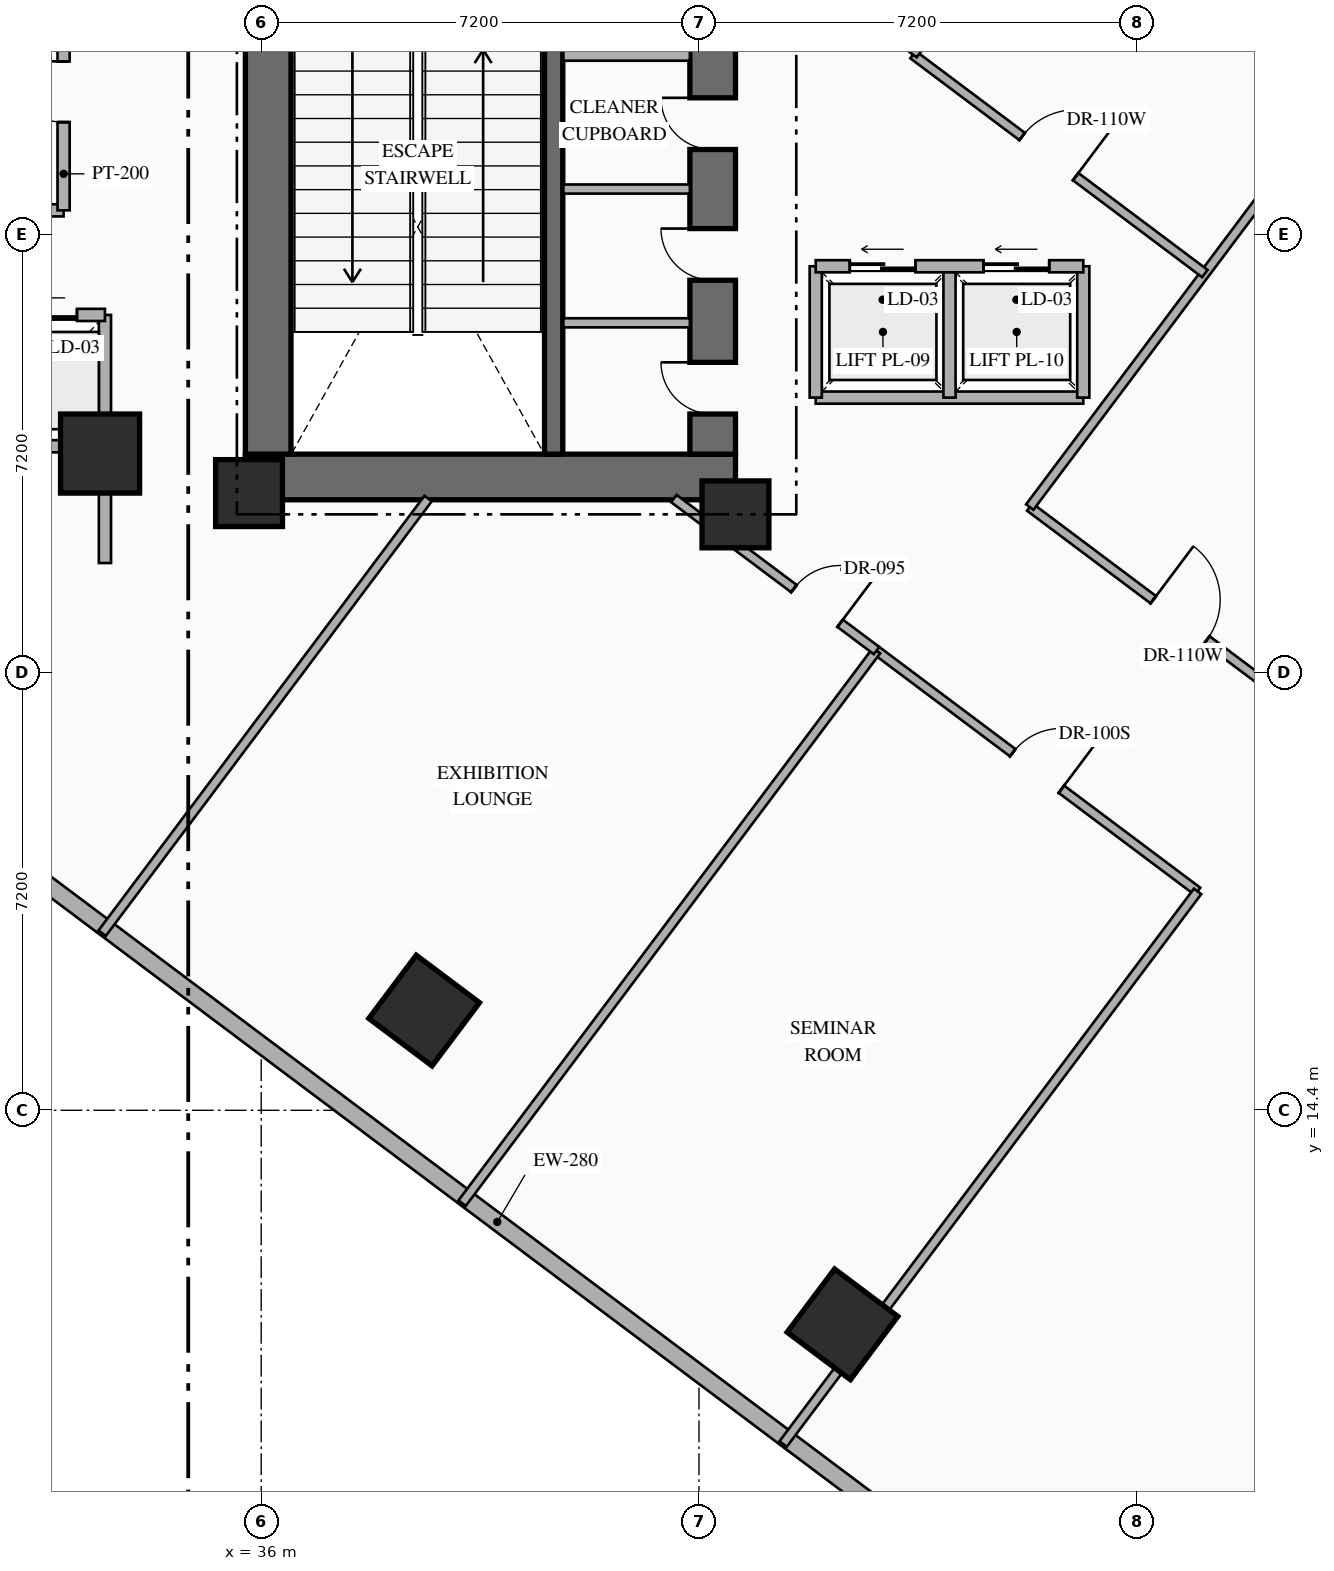
"""IFC4 building model, lengths in metres.
Left out: names, types, materials, properties, quantities, classifications, styles, units other than length and angle.
Written with IfcOpenShell. Run it as: python <this file> out.ifc"""

import sys

from ifc_helpers import new_model, si_unit, direction, frame, frame_2d, origin, origin_2d, place, context, subcontext, project, spatial, rectangle, extrude, element, fill, save


model = new_model("IFC4")
c1 = context("Model", 3, precision=1e-05, world=origin(), true_north=direction((0.0, 1.0)))
c2 = subcontext(c1, "Body", "Model", "MODEL_VIEW")
j1 = project(units=[si_unit("LENGTHUNIT", "METRE"), si_unit("PLANEANGLEUNIT", "RADIAN")], contexts=[c1])
p1 = place(None, origin())
s1 = spatial("IfcSite", under=j1, at=p1, CompositionType="ELEMENT")
p2 = place(p1, origin())
s2 = spatial("IfcBuilding", under=s1, at=p2, CompositionType="ELEMENT")
p3 = place(p2, frame((0.0, 0.0, 10.8)))
s3 = spatial("IfcBuildingStorey", under=s2, at=p3, CompositionType="ELEMENT", Elevation=10.8)
p4 = place(p3, frame((35.74, 24.815, 0.0), z_axis=(0.0, 0.0, 1.0), x_axis=(1.0, 0.0, 0.0)))
e1 = element("IfcWall", 1, at=p4, inside=s3, PredefinedType="SHEAR", context=c2, shape_type="SweptSolid", body=[
    extrude(rectangle(XDim=8.06, YDim=0.75, at=frame_2d((4.03, 0.0))), origin(), (0.0, 0.0, 1.0), 5.4),
])
p5 = place(p3, frame((36.115, 25.19, 0.0), z_axis=(0.0, 0.0, 1.0), x_axis=(0.0, 1.0, 0.0)))
e2 = element("IfcWall", 2, at=p5, inside=s3, PredefinedType="SHEAR", context=c2, shape_type="SweptSolid", body=[
    extrude(rectangle(XDim=9.48, YDim=0.75, at=frame_2d((4.74, 0.0))), origin(), (0.0, 0.0, 1.0), 5.4),
])
p6 = place(p3, frame((43.425, 25.19, 0.0), z_axis=(0.0, 0.0, 1.0), x_axis=(0.0, 1.0, 0.0)))
e3 = element("IfcWall", 3, at=p6, inside=s3, PredefinedType="SHEAR", context=c2, shape_type="SweptSolid", body=[
    extrude(rectangle(XDim=9.48, YDim=0.75, at=frame_2d((4.74, 0.0))), origin(), (0.0, 0.0, 1.0), 5.4),
])
p7 = place(p6, frame((0.66, 0.0, 0.0)))
e4 = element("IfcOpeningElement", 4, at=p7, cuts=e3, PredefinedType="OPENING", context=c2, shape_type="SweptSolid", body=[
    extrude(rectangle(XDim=0.85, YDim=2.08, at=frame_2d((0.425, 1.04))), frame((0.0, 0.385, 0.0), z_axis=(0.0, -1.0, 0.0), x_axis=(1.0, 0.0, 0.0)), (0.0, 0.0, 1.0), 0.77),
])
p8 = place(p6, frame((2.86, 0.0, 0.0)))
e5 = element("IfcOpeningElement", 5, at=p8, cuts=e3, PredefinedType="OPENING", context=c2, shape_type="SweptSolid", body=[
    extrude(rectangle(XDim=0.85, YDim=2.08, at=frame_2d((0.425, 1.04))), frame((0.0, 0.385, 0.0), z_axis=(0.0, -1.0, 0.0), x_axis=(1.0, 0.0, 0.0)), (0.0, 0.0, 1.0), 0.77),
])
p9 = place(p6, frame((5.01, 0.0, 0.0)))
e6 = element("IfcOpeningElement", 6, at=p9, cuts=e3, PredefinedType="OPENING", context=c2, shape_type="SweptSolid", body=[
    extrude(rectangle(XDim=0.85, YDim=2.08, at=frame_2d((0.425, 1.04))), frame((0.0, 0.385, 0.0), z_axis=(0.0, -1.0, 0.0), x_axis=(1.0, 0.0, 0.0)), (0.0, 0.0, 1.0), 0.77),
])
p10 = place(p3, frame((40.81, 25.19, 0.0), z_axis=(0.0, 0.0, 1.0), x_axis=(0.0, 1.0, 0.0)))
e7 = element("IfcWall", 7, at=p10, inside=s3, PredefinedType="SHEAR", context=c2, shape_type="SweptSolid", body=[
    extrude(rectangle(XDim=9.48, YDim=0.3, at=frame_2d((4.74, 0.0))), origin(), (0.0, 0.0, 1.0), 5.4),
])
for number, where, z_axis, x_axis in (
    (8, (35.8, 24.55, 0.0), (0.0, 0.0, 1.0), (1.0, 0.0, 0.0)),
    (9, (43.8, 24.2, 0.0), (0.0, 0.0, 1.0), (1.0, 0.0, 0.0)),
):
    element("IfcColumn", number, at=place(p3, frame(where, z_axis=z_axis, x_axis=x_axis)), inside=s3, PredefinedType="COLUMN", context=c2, shape_type="SweptSolid", body=[
        extrude(rectangle(XDim=1.1, YDim=1.1, at=origin_2d()), origin(), (0.0, 0.0, 1.0), 5.4),
    ])
for number, where, z_axis, x_axis in (
    (10, (33.35, 25.2, 0.0), (0.0, 0.0, 1.0), (1.0, 0.0, 0.0)),
    (11, (38.68, 16.04, 0.0), (0.0, 0.0, 1.0), (0.8, -0.6, 0.0)),
    (12, (45.56, 10.88, 0.0), (0.0, 0.0, 1.0), (0.8, -0.6, 0.0)),
):
    element("IfcColumn", number, at=place(p3, frame(where, z_axis=z_axis, x_axis=x_axis)), inside=s3, PredefinedType="COLUMN", context=c2, shape_type="SweptSolid", body=[
        extrude(rectangle(XDim=1.3, YDim=1.3, at=origin_2d()), origin(), (0.0, 0.0, 1.0), 5.4),
    ])
p11 = place(p3, frame((54.518, 1.587, 0.0), z_axis=(0.0, 0.0, 1.0), x_axis=(-0.800001601415, 0.599997864774, 0.0)))
e13 = element("IfcWall", 13, at=p11, inside=s3, PredefinedType="STANDARD", context=c2, shape_type="SweptSolid", body=[
    extrude(rectangle(XDim=36.589, YDim=0.28, at=frame_2d((18.294, 0.0))), origin(), (0.0, 0.0, 1.0), 5.1),
])
p12 = place(p3, frame((40.97, 31.76, 0.0), z_axis=(0.0, 0.0, 1.0), x_axis=(1.0, 0.0, 0.0)))
e14 = element("IfcWall", 14, at=p12, inside=s3, PredefinedType="STANDARD", context=c2, shape_type="SweptSolid", body=[
    extrude(rectangle(XDim=2.08, YDim=0.2, at=frame_2d((1.04, 0.0))), origin(), (0.0, 0.0, 1.0), 5.1),
])
for number, where, z_axis, x_axis in (
    (15, (40.97, 27.35, 0.0), (0.0, 0.0, 1.0), (1.0, 0.0, 0.0)),
    (16, (40.97, 29.55, 0.0), (0.0, 0.0, 1.0), (1.0, 0.0, 0.0)),
):
    element("IfcWall", number, at=place(p3, frame(where, z_axis=z_axis, x_axis=x_axis)), inside=s3, PredefinedType="PARTITIONING", context=c2, shape_type="SweptSolid", body=[
        extrude(rectangle(XDim=2.08, YDim=0.15, at=frame_2d((1.04, 0.0))), origin(), (0.0, 0.0, 1.0), 5.1),
    ])
p13 = place(p3, frame((27.6, 29.2, 0.0), z_axis=(0.0, 0.0, 1.0), x_axis=(1.0, 0.0, 0.0)))
e17 = element("IfcWall", 17, at=p13, inside=s3, PredefinedType="STANDARD", context=c2, shape_type="SweptSolid", body=[
    extrude(rectangle(XDim=5.15, YDim=0.2, at=frame_2d((2.575, 0.0))), origin(), (0.0, 0.0, 1.0), 5.1),
])
p14 = place(p3, frame((32.75, 29.2, 0.0), z_axis=(0.0, 0.0, 1.0), x_axis=(0.0, 1.0, 0.0)))
e18 = element("IfcWall", 18, at=p14, inside=s3, PredefinedType="STANDARD", context=c2, shape_type="SweptSolid", body=[
    extrude(rectangle(XDim=3.24, YDim=0.2, at=frame_2d((1.62, 0.0))), origin(), (0.0, 0.0, 1.0), 5.1),
])
p15 = place(p14, frame((1.45, 0.0, 0.0)))
e19 = element("IfcOpeningElement", 19, at=p15, cuts=e18, PredefinedType="OPENING", context=c2, shape_type="SweptSolid", body=[
    extrude(rectangle(XDim=1.0, YDim=2.2, at=frame_2d((0.5, 1.1))), frame((0.0, 0.11, 0.0), z_axis=(0.0, -1.0, 0.0), x_axis=(1.0, 0.0, 0.0)), (0.0, 0.0, 1.0), 0.22),
])
p16 = place(p3, frame((33.43, 23.4, 0.0), z_axis=(0.0, 0.0, 1.0), x_axis=(0.0, 1.0, 0.0)))
e20 = element("IfcWall", 20, at=p16, inside=s3, PredefinedType="STANDARD", context=c2, shape_type="SweptSolid", body=[
    extrude(rectangle(XDim=4.08, YDim=0.2, at=frame_2d((2.04, 0.0))), origin(), (0.0, 0.0, 1.0), 3.895),
])
p17 = place(p3, frame((25.55, 25.32, 0.0), z_axis=(0.0, 0.0, 1.0), x_axis=(1.0, 0.0, 0.0)))
e21 = element("IfcWall", 21, at=p17, inside=s3, PredefinedType="STANDARD", context=c2, shape_type="SweptSolid", body=[
    extrude(rectangle(XDim=7.88, YDim=0.2, at=frame_2d((3.94, 0.0))), origin(), (0.0, 0.0, 1.0), 4.495),
])
p18 = place(p3, frame((25.55, 27.48, 0.0), z_axis=(0.0, 0.0, 1.0), x_axis=(1.0, 0.0, 0.0)))
e22 = element("IfcWall", 22, at=p18, inside=s3, PredefinedType="STANDARD", context=c2, shape_type="SweptSolid", body=[
    extrude(rectangle(XDim=7.88, YDim=0.2, at=frame_2d((3.94, 0.0))), origin(), (0.0, 0.0, 1.0), 5.1),
])
p19 = place(p18, frame((0.46, 0.0, 0.0)))
e23 = element("IfcOpeningElement", 23, at=p19, cuts=e22, PredefinedType="OPENING", context=c2, shape_type="SweptSolid", body=[
    extrude(rectangle(XDim=1.08, YDim=2.15, at=frame_2d((0.54, 1.075))), frame((0.0, 0.11, 0.0), z_axis=(0.0, -1.0, 0.0), x_axis=(1.0, 0.0, 0.0)), (0.0, 0.0, 1.0), 0.22),
])
p20 = place(p18, frame((2.42, 0.0, 0.0)))
e24 = element("IfcOpeningElement", 24, at=p20, cuts=e22, PredefinedType="OPENING", context=c2, shape_type="SweptSolid", body=[
    extrude(rectangle(XDim=1.08, YDim=2.15, at=frame_2d((0.54, 1.075))), frame((0.0, 0.11, 0.0), z_axis=(0.0, -1.0, 0.0), x_axis=(1.0, 0.0, 0.0)), (0.0, 0.0, 1.0), 0.22),
])
p21 = place(p18, frame((4.38, 0.0, 0.0)))
e25 = element("IfcOpeningElement", 25, at=p21, cuts=e22, PredefinedType="OPENING", context=c2, shape_type="SweptSolid", body=[
    extrude(rectangle(XDim=1.08, YDim=2.15, at=frame_2d((0.54, 1.075))), frame((0.0, 0.11, 0.0), z_axis=(0.0, -1.0, 0.0), x_axis=(1.0, 0.0, 0.0)), (0.0, 0.0, 1.0), 0.22),
])
p22 = place(p18, frame((6.34, 0.0, 0.0)))
e26 = element("IfcOpeningElement", 26, at=p22, cuts=e22, PredefinedType="OPENING", context=c2, shape_type="SweptSolid", body=[
    extrude(rectangle(XDim=1.08, YDim=2.15, at=frame_2d((0.54, 1.075))), frame((0.0, 0.11, 0.0), z_axis=(0.0, -1.0, 0.0), x_axis=(1.0, 0.0, 0.0)), (0.0, 0.0, 1.0), 0.22),
])
p23 = place(p3, frame((45.12, 26.12, 0.0), z_axis=(0.0, 0.0, 1.0), x_axis=(1.0, 0.0, 0.0)))
e27 = element("IfcWall", 27, at=p23, inside=s3, PredefinedType="STANDARD", context=c2, shape_type="SweptSolid", body=[
    extrude(rectangle(XDim=4.4, YDim=0.2, at=frame_2d((2.2, 0.0))), origin(), (0.0, 0.0, 1.0), 5.1),
])
for number, where, z_axis, x_axis in (
    (28, (45.12, 26.12, 0.0), (0.0, 0.0, 1.0), (0.0, 1.0, 0.0)),
    (29, (49.52, 26.12, 0.0), (0.0, 0.0, 1.0), (0.0, 1.0, 0.0)),
    (30, (47.32, 26.12, 0.0), (0.0, 0.0, 1.0), (0.0, 1.0, 0.0)),
):
    element("IfcWall", number, at=place(p3, frame(where, z_axis=z_axis, x_axis=x_axis)), inside=s3, PredefinedType="STANDARD", context=c2, shape_type="SweptSolid", body=[
        extrude(rectangle(XDim=2.16, YDim=0.2, at=frame_2d((1.08, 0.0))), origin(), (0.0, 0.0, 1.0), 5.1),
    ])
p24 = place(p3, frame((45.12, 28.28, 0.0), z_axis=(0.0, 0.0, 1.0), x_axis=(1.0, 0.0, 0.0)))
e31 = element("IfcWall", 31, at=p24, inside=s3, PredefinedType="STANDARD", context=c2, shape_type="SweptSolid", body=[
    extrude(rectangle(XDim=4.4, YDim=0.2, at=frame_2d((2.2, 0.0))), origin(), (0.0, 0.0, 1.0), 5.1),
])
p25 = place(p24, frame((0.56, 0.0, 0.0)))
e32 = element("IfcOpeningElement", 32, at=p25, cuts=e31, PredefinedType="OPENING", context=c2, shape_type="SweptSolid", body=[
    extrude(rectangle(XDim=1.08, YDim=2.15, at=frame_2d((0.54, 1.075))), frame((0.0, 0.11, 0.0), z_axis=(0.0, -1.0, 0.0), x_axis=(1.0, 0.0, 0.0)), (0.0, 0.0, 1.0), 0.22),
])
p26 = place(p24, frame((2.76, 0.0, 0.0)))
e33 = element("IfcOpeningElement", 33, at=p26, cuts=e31, PredefinedType="OPENING", context=c2, shape_type="SweptSolid", body=[
    extrude(rectangle(XDim=1.08, YDim=2.15, at=frame_2d((0.54, 1.075))), frame((0.0, 0.11, 0.0), z_axis=(0.0, -1.0, 0.0), x_axis=(1.0, 0.0, 0.0)), (0.0, 0.0, 1.0), 0.22),
])
p27 = place(p3, frame((48.64, 24.32, 0.0), z_axis=(0.0, 0.0, 1.0), x_axis=(0.80000474051, -0.599993679268, 0.0)))
e34 = element("IfcWall", 34, at=p27, inside=s3, PredefinedType="PARTITIONING", context=c2, shape_type="SweptSolid", body=[
    extrude(rectangle(XDim=6.18, YDim=0.15, at=frame_2d((3.09, 0.0))), origin(), (0.0, 0.0, 1.0), 5.1),
])
p28 = place(p27, frame((2.54, 0.0, 0.0)))
e35 = element("IfcOpeningElement", 35, at=p28, cuts=e34, PredefinedType="OPENING", context=c2, shape_type="SweptSolid", body=[
    extrude(rectangle(XDim=1.1, YDim=2.16, at=frame_2d((0.55, 1.08))), frame((0.0, 0.085, 0.0), z_axis=(0.0, -1.0, 0.0), x_axis=(1.0, 0.0, 0.0)), (0.0, 0.0, 1.0), 0.17),
])
p29 = place(p3, frame((48.64, 24.32, 0.0), z_axis=(0.0, 0.0, 1.0), x_axis=(0.600017820398, 0.799986634391, 0.0)))
e36 = element("IfcWall", 36, at=p29, inside=s3, PredefinedType="PARTITIONING", context=c2, shape_type="SweptSolid", body=[
    extrude(rectangle(XDim=10.96, YDim=0.15, at=frame_2d((5.48, 0.0))), origin(), (0.0, 0.0, 1.0), 5.1),
])
p30 = place(p3, frame((46.12, 21.96, 0.0), z_axis=(0.0, 0.0, 1.0), x_axis=(0.799991121809, -0.600011837406, 0.0)))
e37 = element("IfcWall", 37, at=p30, inside=s3, PredefinedType="PARTITIONING", context=c2, shape_type="SweptSolid", body=[
    extrude(rectangle(XDim=6.6, YDim=0.15, at=frame_2d((3.3, 0.0))), origin(), (0.0, 0.0, 1.0), 5.1),
])
p31 = place(p30, frame((2.8, 0.0, 0.0)))
e38 = element("IfcOpeningElement", 38, at=p31, cuts=e37, PredefinedType="OPENING", context=c2, shape_type="SweptSolid", body=[
    extrude(rectangle(XDim=1.0, YDim=2.15, at=frame_2d((0.5, 1.075))), frame((0.0, 0.085, 0.0), z_axis=(0.0, -1.0, 0.0), x_axis=(1.0, 0.0, 0.0)), (0.0, 0.0, 1.0), 0.17),
])
p32 = place(p3, frame((39.304, 12.872, 0.0), z_axis=(0.0, 0.0, 1.0), x_axis=(0.600013754301, 0.79998968409, 0.0)))
e39 = element("IfcWall", 39, at=p32, inside=s3, PredefinedType="PARTITIONING", context=c2, shape_type="SweptSolid", body=[
    extrude(rectangle(XDim=11.36, YDim=0.15, at=frame_2d((5.68, 0.0))), origin(), (0.0, 0.0, 1.0), 5.1),
])
p33 = place(p3, frame((44.584, 8.912, 0.0), z_axis=(0.0, 0.0, 1.0), x_axis=(0.6, 0.8, 0.0)))
e40 = element("IfcWall", 40, at=p33, inside=s3, PredefinedType="PARTITIONING", context=c2, shape_type="SweptSolid", body=[
    extrude(rectangle(XDim=11.36, YDim=0.15, at=frame_2d((5.68, 0.0))), origin(), (0.0, 0.0, 1.0), 5.1),
])
p34 = place(p3, frame((46.72, 31.76, 0.0), z_axis=(0.0, 0.0, 1.0), x_axis=(0.79999511724, -0.600006510291, 0.0)))
e41 = element("IfcWall", 41, at=p34, inside=s3, PredefinedType="PARTITIONING", context=c2, shape_type="SweptSolid", body=[
    extrude(rectangle(XDim=6.0, YDim=0.15, at=frame_2d((3.0, 0.0))), origin(), (0.0, 0.0, 1.0), 5.1),
])
p35 = place(p34, frame((2.243, 0.0, 0.0)))
e42 = element("IfcOpeningElement", 42, at=p35, cuts=e41, PredefinedType="OPENING", context=c2, shape_type="SweptSolid", body=[
    extrude(rectangle(XDim=1.1, YDim=2.16, at=frame_2d((0.55, 1.08))), frame((0.0, 0.085, 0.0), z_axis=(0.0, -1.0, 0.0), x_axis=(1.0, 0.0, 0.0)), (0.0, 0.0, 1.0), 0.17),
])
p36 = place(p3, frame((46.72, 31.76, 0.0), z_axis=(0.0, 0.0, 1.0), x_axis=(0.600006341286, 0.799995243996, 0.0)))
e43 = element("IfcWall", 43, at=p36, inside=s3, PredefinedType="PARTITIONING", context=c2, shape_type="SweptSolid", body=[
    extrude(rectangle(XDim=6.16, YDim=0.15, at=frame_2d((3.08, 0.0))), origin(), (0.0, 0.0, 1.0), 5.1),
])
p37 = place(p3, frame((42.787, 24.46, 0.0), z_axis=(0.0, 0.0, 1.0), x_axis=(0.799971872363, -0.600037501685, 0.0)))
e44 = element("IfcWall", 44, at=p37, inside=s3, PredefinedType="PARTITIONING", context=c2, shape_type="SweptSolid", body=[
    extrude(rectangle(XDim=4.167, YDim=0.15, at=frame_2d((2.083, 0.0))), origin(), (0.0, 0.0, 1.0), 5.1),
])
p38 = place(p37, frame((2.468, 0.0, 0.0)))
e45 = element("IfcOpeningElement", 45, at=p38, cuts=e44, PredefinedType="OPENING", context=c2, shape_type="SweptSolid", body=[
    extrude(rectangle(XDim=0.95, YDim=2.15, at=frame_2d((0.475, 1.075))), frame((0.0, 0.085, 0.0), z_axis=(0.0, -1.0, 0.0), x_axis=(1.0, 0.0, 0.0)), (0.0, 0.0, 1.0), 0.17),
])
p39 = place(p3, frame((33.384, 17.312, 0.0), z_axis=(0.0, 0.0, 1.0), x_axis=(0.600008743659, 0.799993442181, 0.0)))
e46 = element("IfcWall", 46, at=p39, inside=s3, PredefinedType="PARTITIONING", context=c2, shape_type="SweptSolid", body=[
    extrude(rectangle(XDim=8.935, YDim=0.15, at=frame_2d((4.468, 0.0))), origin(), (0.0, 0.0, 1.0), 5.1),
])
p40 = place(p7, origin())
e47 = element("IfcDoor", 47, at=p40, inside=s3, OperationType="SINGLE_SWING_RIGHT", PredefinedType="DOOR", context=c2, shape_type="SweptSolid", body=[
    extrude(rectangle(XDim=0.85, YDim=2.08, at=frame_2d((0.425, 1.04))), frame((0.0, 0.025, 0.0), z_axis=(0.0, -1.0, 0.0), x_axis=(1.0, 0.0, 0.0)), (0.0, 0.0, 1.0), 0.05),
])
fill(e4, e47)
p41 = place(p8, origin())
e48 = element("IfcDoor", 48, at=p41, inside=s3, OperationType="SINGLE_SWING_RIGHT", PredefinedType="DOOR", context=c2, shape_type="SweptSolid", body=[
    extrude(rectangle(XDim=0.85, YDim=2.08, at=frame_2d((0.425, 1.04))), frame((0.0, 0.025, 0.0), z_axis=(0.0, -1.0, 0.0), x_axis=(1.0, 0.0, 0.0)), (0.0, 0.0, 1.0), 0.05),
])
fill(e5, e48)
p42 = place(p9, origin())
e49 = element("IfcDoor", 49, at=p42, inside=s3, OperationType="SINGLE_SWING_RIGHT", PredefinedType="DOOR", context=c2, shape_type="SweptSolid", body=[
    extrude(rectangle(XDim=0.85, YDim=2.08, at=frame_2d((0.425, 1.04))), frame((0.0, 0.025, 0.0), z_axis=(0.0, -1.0, 0.0), x_axis=(1.0, 0.0, 0.0)), (0.0, 0.0, 1.0), 0.05),
])
fill(e6, e49)
p43 = place(p15, origin())
e50 = element("IfcDoor", 50, at=p43, inside=s3, OperationType="SINGLE_SWING_RIGHT", PredefinedType="DOOR", context=c2, shape_type="SweptSolid", body=[
    extrude(rectangle(XDim=1.0, YDim=2.2, at=frame_2d((0.5, 1.1))), frame((0.0, 0.025, 0.0), z_axis=(0.0, -1.0, 0.0), x_axis=(1.0, 0.0, 0.0)), (0.0, 0.0, 1.0), 0.05),
])
fill(e19, e50)
p44 = place(p22, origin())
e51 = element("IfcDoor", 51, at=p44, inside=s3, OperationType="SLIDING_TO_LEFT", PredefinedType="USERDEFINED", context=c2, shape_type="SweptSolid", body=[
    extrude(rectangle(XDim=1.08, YDim=2.15, at=frame_2d((0.54, 1.075))), frame((0.0, 0.025, 0.0), z_axis=(0.0, -1.0, 0.0), x_axis=(1.0, 0.0, 0.0)), (0.0, 0.0, 1.0), 0.05),
])
fill(e26, e51)
p45 = place(p25, origin())
e52 = element("IfcDoor", 52, at=p45, inside=s3, OperationType="SLIDING_TO_LEFT", PredefinedType="USERDEFINED", context=c2, shape_type="SweptSolid", body=[
    extrude(rectangle(XDim=1.08, YDim=2.15, at=frame_2d((0.54, 1.075))), frame((0.0, 0.025, 0.0), z_axis=(0.0, -1.0, 0.0), x_axis=(1.0, 0.0, 0.0)), (0.0, 0.0, 1.0), 0.05),
])
fill(e32, e52)
p46 = place(p26, origin())
e53 = element("IfcDoor", 53, at=p46, inside=s3, OperationType="SLIDING_TO_LEFT", PredefinedType="USERDEFINED", context=c2, shape_type="SweptSolid", body=[
    extrude(rectangle(XDim=1.08, YDim=2.15, at=frame_2d((0.54, 1.075))), frame((0.0, 0.025, 0.0), z_axis=(0.0, -1.0, 0.0), x_axis=(1.0, 0.0, 0.0)), (0.0, 0.0, 1.0), 0.05),
])
fill(e33, e53)
p47 = place(p28, origin())
e54 = element("IfcDoor", 54, at=p47, inside=s3, OperationType="SINGLE_SWING_LEFT", PredefinedType="DOOR", context=c2, shape_type="SweptSolid", body=[
    extrude(rectangle(XDim=1.1, YDim=2.16, at=frame_2d((0.55, 1.08))), frame((0.0, 0.025, 0.0), z_axis=(0.0, -1.0, 0.0), x_axis=(1.0, 0.0, 0.0)), (0.0, 0.0, 1.0), 0.05),
])
fill(e35, e54)
p48 = place(p31, origin())
e55 = element("IfcDoor", 55, at=p48, inside=s3, OperationType="SINGLE_SWING_RIGHT", PredefinedType="DOOR", context=c2, shape_type="SweptSolid", body=[
    extrude(rectangle(XDim=1.0, YDim=2.15, at=frame_2d((0.5, 1.075))), frame((0.0, 0.025, 0.0), z_axis=(0.0, -1.0, 0.0), x_axis=(1.0, 0.0, 0.0)), (0.0, 0.0, 1.0), 0.05),
])
fill(e38, e55)
p49 = place(p35, origin())
e56 = element("IfcDoor", 56, at=p49, inside=s3, OperationType="SINGLE_SWING_RIGHT", PredefinedType="DOOR", context=c2, shape_type="SweptSolid", body=[
    extrude(rectangle(XDim=1.1, YDim=2.16, at=frame_2d((0.55, 1.08))), frame((0.0, 0.025, 0.0), z_axis=(0.0, -1.0, 0.0), x_axis=(1.0, 0.0, 0.0)), (0.0, 0.0, 1.0), 0.05),
])
fill(e42, e56)
p50 = place(p38, origin())
e57 = element("IfcDoor", 57, at=p50, inside=s3, OperationType="SINGLE_SWING_RIGHT", PredefinedType="DOOR", context=c2, shape_type="SweptSolid", body=[
    extrude(rectangle(XDim=0.95, YDim=2.15, at=frame_2d((0.475, 1.075))), frame((0.0, 0.025, 0.0), z_axis=(0.0, -1.0, 0.0), x_axis=(1.0, 0.0, 0.0)), (0.0, 0.0, 1.0), 0.05),
])
fill(e45, e57)
save(model, sys.argv[1])
